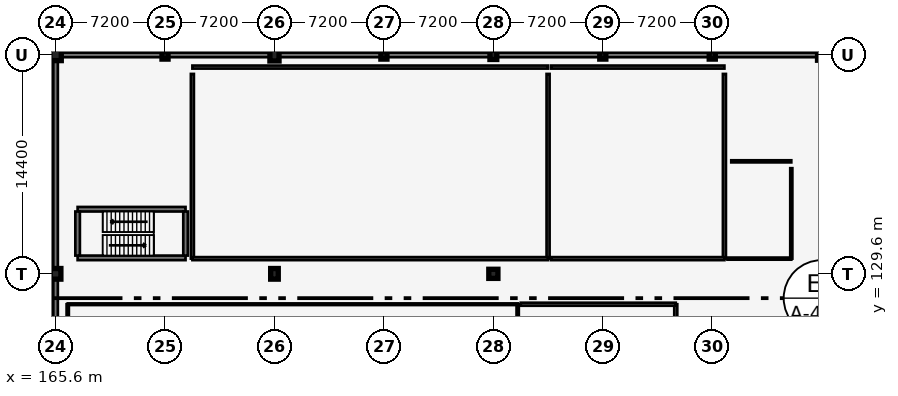
"""IFC4 building model, lengths in metres.
Left out: names, types, materials, properties, quantities, classifications, styles, units other than length and angle.
Written with IfcOpenShell. Run it as: python <this file> out.ifc"""

import sys

from ifc_helpers import new_model, si_unit, direction, frame, frame_2d, origin, origin_2d, place, context, subcontext, project, spatial, rectangle, circle, extrude, element, fill, save


model = new_model("IFC4")
c1 = context("Model", 3, precision=1e-05, world=origin(), true_north=direction((0.0, 1.0)))
c2 = subcontext(c1, "Body", "Model", "MODEL_VIEW")
j1 = project(units=[si_unit("LENGTHUNIT", "METRE"), si_unit("PLANEANGLEUNIT", "RADIAN")], contexts=[c1])
p1 = place(None, origin())
s1 = spatial("IfcSite", under=j1, at=p1, CompositionType="ELEMENT")
p2 = place(p1, origin())
s2 = spatial("IfcBuilding", under=s1, at=p2, CompositionType="ELEMENT")
p3 = place(p2, origin())
s3 = spatial("IfcBuildingStorey", under=s2, at=p3, CompositionType="ELEMENT", Elevation=0.0)
p4 = place(p3, frame((165.6, 129.6, 0.0), z_axis=(0.0, 0.0, 1.0), x_axis=(1.0, 0.0, 0.0)))
e1 = element("IfcColumn", 1, at=p4, inside=s3, PredefinedType="COLUMN", context=c2, shape_type="SweptSolid", body=[
    extrude(rectangle(XDim=0.7, YDim=0.7, at=origin_2d()), origin(), (0.0, 0.0, 1.0), 4.8),
])
p5 = place(p3, frame((165.6, 144.0, 0.0), z_axis=(0.0, 0.0, 1.0), x_axis=(1.0, 0.0, 0.0)))
e2 = element("IfcColumn", 2, at=p5, inside=s3, PredefinedType="COLUMN", context=c2, shape_type="SweptSolid", body=[
    extrude(rectangle(XDim=0.75, YDim=0.75, at=origin_2d()), origin(), (0.0, 0.0, 1.0), 4.8),
])
p6 = place(p3, frame((180.0, 129.6, 0.0), z_axis=(0.0, 0.0, 1.0), x_axis=(1.0, 0.0, 0.0)))
e3 = element("IfcColumn", 3, at=p6, inside=s3, PredefinedType="COLUMN", context=c2, shape_type="SweptSolid", body=[
    extrude(rectangle(XDim=0.5, YDim=0.7, at=origin_2d()), origin(), (0.0, 0.0, 1.0), 4.8),
])
p7 = place(p3, frame((180.0, 144.0, 0.0), z_axis=(0.0, 0.0, 1.0), x_axis=(1.0, 0.0, 0.0)))
e4 = element("IfcColumn", 4, at=p7, inside=s3, PredefinedType="COLUMN", context=c2, shape_type="SweptSolid", body=[
    extrude(rectangle(XDim=0.6, YDim=0.8, at=origin_2d()), origin(), (0.0, 0.0, 1.0), 4.8),
])
p8 = place(p3, frame((194.4, 129.6, 0.0), z_axis=(0.0, 0.0, 1.0), x_axis=(1.0, 0.0, 0.0)))
e5 = element("IfcColumn", 5, at=p8, inside=s3, PredefinedType="COLUMN", context=c2, shape_type="SweptSolid", body=[
    extrude(circle(Radius=0.3, at=origin_2d()), origin(), (0.0, 0.0, 1.0), 4.8),
])
p9 = place(p3, frame((194.4, 144.0, 0.0), z_axis=(0.0, 0.0, 1.0), x_axis=(1.0, 0.0, 0.0)))
e6 = element("IfcColumn", 6, at=p9, inside=s3, PredefinedType="COLUMN", context=c2, shape_type="SweptSolid", body=[
    extrude(rectangle(XDim=0.45, YDim=0.6, at=origin_2d()), origin(), (0.0, 0.0, 1.0), 4.8),
])
p10 = place(p3, frame((216.0, 129.6, 0.0), z_axis=(0.0, 0.0, 1.0), x_axis=(1.0, 0.0, 0.0)))
e7 = element("IfcColumn", 7, at=p10, inside=s3, PredefinedType="COLUMN", context=c2, shape_type="SweptSolid", body=[
    extrude(rectangle(XDim=0.5, YDim=0.65, at=origin_2d()), origin(), (0.0, 0.0, 1.0), 4.8),
])
p11 = place(p3, frame((216.0, 144.0, 0.0), z_axis=(0.0, 0.0, 1.0), x_axis=(1.0, 0.0, 0.0)))
e8 = element("IfcColumn", 8, at=p11, inside=s3, PredefinedType="COLUMN", context=c2, shape_type="SweptSolid", body=[
    extrude(rectangle(XDim=0.55, YDim=0.7, at=origin_2d()), origin(), (0.0, 0.0, 1.0), 4.8),
])
for number, where, z_axis, x_axis in (
    (9, (172.8, 144.0, 0.0), (0.0, 0.0, 1.0), (1.0, 0.0, 0.0)),
    (10, (187.2, 144.0, 0.0), (0.0, 0.0, 1.0), (1.0, 0.0, 0.0)),
    (11, (201.6, 144.0, 0.0), (0.0, 0.0, 1.0), (1.0, 0.0, 0.0)),
    (12, (208.8, 144.0, 0.0), (0.0, 0.0, 1.0), (1.0, 0.0, 0.0)),
):
    element("IfcColumn", number, at=place(p3, frame(where, z_axis=z_axis, x_axis=x_axis)), inside=s3, PredefinedType="PILASTER", context=c2, shape_type="SweptSolid", body=[
        extrude(rectangle(XDim=0.4, YDim=0.55, at=origin_2d()), origin(), (0.0, 0.0, 1.0), 4.4),
    ])
p12 = place(p3, frame((216.0, 144.0, 0.0), z_axis=(0.0, 0.0, 1.0), x_axis=(-1.0, 0.0, 0.0)))
e13 = element("IfcWall", 13, at=p12, inside=s3, PredefinedType="SOLIDWALL", context=c2, shape_type="SweptSolid", body=[
    extrude(rectangle(XDim=50.4, YDim=0.3, at=frame_2d((25.2, 0.0))), origin(), (0.0, 0.0, 1.0), 4.25),
])
p13 = place(p12, frame((2.2, 0.0, 1.4)))
e14 = element("IfcOpeningElement", 14, at=p13, cuts=e13, PredefinedType="OPENING", context=c2, shape_type="SweptSolid", body=[
    extrude(rectangle(XDim=1.5, YDim=1.15, at=frame_2d((0.75, 0.575))), frame((0.0, 0.16, 0.0), z_axis=(0.0, -1.0, 0.0), x_axis=(1.0, 0.0, 0.0)), (0.0, 0.0, 1.0), 0.32),
])
p14 = place(p12, frame((9.4, 0.0, 1.4)))
e15 = element("IfcOpeningElement", 15, at=p14, cuts=e13, PredefinedType="OPENING", context=c2, shape_type="SweptSolid", body=[
    extrude(rectangle(XDim=1.8, YDim=1.15, at=frame_2d((0.9, 0.575))), frame((0.0, 0.16, 0.0), z_axis=(0.0, -1.0, 0.0), x_axis=(1.0, 0.0, 0.0)), (0.0, 0.0, 1.0), 0.32),
])
p15 = place(p12, frame((16.6, 0.0, 1.4)))
e16 = element("IfcOpeningElement", 16, at=p15, cuts=e13, PredefinedType="OPENING", context=c2, shape_type="SweptSolid", body=[
    extrude(rectangle(XDim=1.5, YDim=1.15, at=frame_2d((0.75, 0.575))), frame((0.0, 0.16, 0.0), z_axis=(0.0, -1.0, 0.0), x_axis=(1.0, 0.0, 0.0)), (0.0, 0.0, 1.0), 0.32),
])
p16 = place(p12, frame((23.8, 0.0, 1.4)))
e17 = element("IfcOpeningElement", 17, at=p16, cuts=e13, PredefinedType="OPENING", context=c2, shape_type="SweptSolid", body=[
    extrude(rectangle(XDim=1.8, YDim=1.15, at=frame_2d((0.9, 0.575))), frame((0.0, 0.16, 0.0), z_axis=(0.0, -1.0, 0.0), x_axis=(1.0, 0.0, 0.0)), (0.0, 0.0, 1.0), 0.32),
])
p17 = place(p12, frame((31.0, 0.0, 1.4)))
e18 = element("IfcOpeningElement", 18, at=p17, cuts=e13, PredefinedType="OPENING", context=c2, shape_type="SweptSolid", body=[
    extrude(rectangle(XDim=1.5, YDim=1.15, at=frame_2d((0.75, 0.575))), frame((0.0, 0.16, 0.0), z_axis=(0.0, -1.0, 0.0), x_axis=(1.0, 0.0, 0.0)), (0.0, 0.0, 1.0), 0.32),
])
p18 = place(p12, frame((38.2, 0.0, 1.4)))
e19 = element("IfcOpeningElement", 19, at=p18, cuts=e13, PredefinedType="OPENING", context=c2, shape_type="SweptSolid", body=[
    extrude(rectangle(XDim=1.8, YDim=1.15, at=frame_2d((0.9, 0.575))), frame((0.0, 0.16, 0.0), z_axis=(0.0, -1.0, 0.0), x_axis=(1.0, 0.0, 0.0)), (0.0, 0.0, 1.0), 0.32),
])
p19 = place(p3, frame((165.6, 144.0, 0.0), z_axis=(0.0, 0.0, 1.0), x_axis=(0.0, -1.0, 0.0)))
e20 = element("IfcWall", 20, at=p19, inside=s3, PredefinedType="SOLIDWALL", context=c2, shape_type="SweptSolid", body=[
    extrude(rectangle(XDim=28.8, YDim=0.3, at=frame_2d((14.4, 0.0))), origin(), (0.0, 0.0, 1.0), 4.25),
])
p20 = place(p19, frame((4.2, 0.0, 0.0)))
e21 = element("IfcOpeningElement", 21, at=p20, cuts=e20, PredefinedType="OPENING", context=c2, shape_type="SweptSolid", body=[
    extrude(rectangle(XDim=4.2, YDim=3.5, at=frame_2d((2.1, 1.75))), frame((0.0, 0.16, 0.0), z_axis=(0.0, -1.0, 0.0), x_axis=(1.0, 0.0, 0.0)), (0.0, 0.0, 1.0), 0.32),
])
p21 = place(p19, frame((18.2, 0.0, 0.0)))
e22 = element("IfcOpeningElement", 22, at=p21, cuts=e20, PredefinedType="OPENING", context=c2, shape_type="SweptSolid", body=[
    extrude(rectangle(XDim=4.2, YDim=3.5, at=frame_2d((2.1, 1.75))), frame((0.0, 0.16, 0.0), z_axis=(0.0, -1.0, 0.0), x_axis=(1.0, 0.0, 0.0)), (0.0, 0.0, 1.0), 0.32),
])
p22 = place(p3, frame((167.05, 130.65, 0.0), z_axis=(0.0, 0.0, 1.0), x_axis=(1.0, 0.0, 0.0)))
e23 = element("IfcWall", 23, at=p22, inside=s3, PredefinedType="SHEAR", context=c2, shape_type="SweptSolid", body=[
    extrude(rectangle(XDim=7.1, YDim=0.3, at=frame_2d((3.55, 0.0))), origin(), (0.0, 0.0, 1.0), 4.525),
])
p23 = place(p22, frame((0.35, 0.0, 0.0)))
e24 = element("IfcOpeningElement", 24, at=p23, cuts=e23, PredefinedType="OPENING", context=c2, shape_type="SweptSolid", body=[
    extrude(rectangle(XDim=1.05, YDim=2.15, at=frame_2d((0.525, 1.075))), frame((0.0, 0.16, 0.0), z_axis=(0.0, -1.0, 0.0), x_axis=(1.0, 0.0, 0.0)), (0.0, 0.0, 1.0), 0.32),
])
p24 = place(p3, frame((174.15, 133.85, 0.0), z_axis=(0.0, 0.0, 1.0), x_axis=(-1.0, 0.0, 0.0)))
e25 = element("IfcWall", 25, at=p24, inside=s3, PredefinedType="SHEAR", context=c2, shape_type="SweptSolid", body=[
    extrude(rectangle(XDim=7.1, YDim=0.3, at=frame_2d((3.55, 0.0))), origin(), (0.0, 0.0, 1.0), 4.525),
])
for number, where, z_axis, x_axis in (
    (26, (174.15, 130.8, 0.0), (0.0, 0.0, 1.0), (0.0, 1.0, 0.0)),
    (27, (167.05, 133.7, 0.0), (0.0, 0.0, 1.0), (0.0, -1.0, 0.0)),
):
    element("IfcWall", number, at=place(p3, frame(where, z_axis=z_axis, x_axis=x_axis)), inside=s3, PredefinedType="SHEAR", context=c2, shape_type="SweptSolid", body=[
        extrude(rectangle(XDim=2.9, YDim=0.3, at=frame_2d((1.45, 0.0))), origin(), (0.0, 0.0, 1.0), 4.525),
    ])
for number, where, z_axis, x_axis in (
    (28, (196.0, 116.45, 0.0), (0.0, 0.0, 1.0), (0.0, 1.0, 0.0)),
    (29, (166.4, 127.6, 0.0), (0.0, 0.0, 1.0), (0.0, -1.0, 0.0)),
):
    element("IfcWall", number, at=place(p3, frame(where, z_axis=z_axis, x_axis=x_axis)), inside=s3, PredefinedType="PARTITIONING", context=c2, shape_type="SweptSolid", body=[
        extrude(rectangle(XDim=11.15, YDim=0.15, at=frame_2d((5.575, 0.0))), origin(), (0.0, 0.0, 1.0), 4.1),
    ])
p25 = place(p3, frame((166.4, 127.6, 0.0), z_axis=(0.0, 0.0, 1.0), x_axis=(1.0, 0.0, 0.0)))
e30 = element("IfcWall", 30, at=p25, inside=s3, PredefinedType="PARTITIONING", context=c2, shape_type="SweptSolid", body=[
    extrude(rectangle(XDim=29.6, YDim=0.11, at=frame_2d((14.8, 0.0))), origin(), (0.0, 0.0, 1.0), 3.974),
])
p26 = place(p25, frame((14.32, 0.0, 0.0)))
e31 = element("IfcOpeningElement", 31, at=p26, cuts=e30, PredefinedType="OPENING", context=c2, shape_type="SweptSolid", body=[
    extrude(rectangle(XDim=0.96, YDim=2.15, at=frame_2d((0.48, 1.075))), frame((0.0, 0.065, 0.0), z_axis=(0.0, -1.0, 0.0), x_axis=(1.0, 0.0, 0.0)), (0.0, 0.0, 1.0), 0.13),
])
p27 = place(p3, frame((206.4, 116.45, 0.0), z_axis=(0.0, 0.0, 1.0), x_axis=(0.0, 1.0, 0.0)))
e32 = element("IfcWall", 32, at=p27, inside=s3, PredefinedType="SOLIDWALL", context=c2, shape_type="SweptSolid", body=[
    extrude(rectangle(XDim=11.15, YDim=0.2, at=frame_2d((5.575, 0.0))), origin(), (0.0, 0.0, 1.0), 4.1),
])
p28 = place(p3, frame((196.2, 127.6, 0.0), z_axis=(0.0, 0.0, 1.0), x_axis=(1.0, 0.0, 0.0)))
e33 = element("IfcWall", 33, at=p28, inside=s3, PredefinedType="SOLIDWALL", context=c2, shape_type="SweptSolid", body=[
    extrude(rectangle(XDim=10.2, YDim=0.2, at=frame_2d((5.1, 0.0))), origin(), (0.0, 0.0, 1.0), 4.1),
])
p29 = place(p28, frame((4.2, 0.0, 0.0)))
e34 = element("IfcOpeningElement", 34, at=p29, cuts=e33, PredefinedType="OPENING", context=c2, shape_type="SweptSolid", body=[
    extrude(rectangle(XDim=1.8, YDim=2.2, at=frame_2d((0.9, 1.1))), frame((0.0, 0.11, 0.0), z_axis=(0.0, -1.0, 0.0), x_axis=(1.0, 0.0, 0.0)), (0.0, 0.0, 1.0), 0.22),
])
p30 = place(p3, frame((174.6, 143.2, 0.0), z_axis=(0.0, 0.0, 1.0), x_axis=(1.0, 0.0, 0.0)))
e35 = element("IfcWall", 35, at=p30, inside=s3, PredefinedType="SOLIDWALL", context=c2, shape_type="SweptSolid", body=[
    extrude(rectangle(XDim=23.4, YDim=0.2, at=frame_2d((11.7, 0.0))), origin(), (0.0, 0.0, 1.0), 3.896),
])
for number, where, z_axis, x_axis in (
    (36, (198.0, 130.6, 0.0), (0.0, 0.0, 1.0), (0.0, 1.0, 0.0)),
    (37, (174.6, 142.75, 0.0), (0.0, 0.0, 1.0), (0.0, -1.0, 0.0)),
):
    element("IfcWall", number, at=place(p3, frame(where, z_axis=z_axis, x_axis=x_axis)), inside=s3, PredefinedType="SOLIDWALL", context=c2, shape_type="SweptSolid", body=[
        extrude(rectangle(XDim=12.15, YDim=0.2, at=frame_2d((6.075, 0.0))), origin(), (0.0, 0.0, 1.0), 4.1),
    ])
p31 = place(p3, frame((198.0, 130.6, 0.0), z_axis=(0.0, 0.0, 1.0), x_axis=(-1.0, 0.0, 0.0)))
e38 = element("IfcWall", 38, at=p31, inside=s3, PredefinedType="SOLIDWALL", context=c2, shape_type="SweptSolid", body=[
    extrude(rectangle(XDim=23.4, YDim=0.2, at=frame_2d((11.7, 0.0))), origin(), (0.0, 0.0, 1.0), 3.896),
])
p32 = place(p31, frame((10.8, 0.0, 0.0)))
e39 = element("IfcOpeningElement", 39, at=p32, cuts=e38, PredefinedType="OPENING", context=c2, shape_type="SweptSolid", body=[
    extrude(rectangle(XDim=1.8, YDim=2.2, at=frame_2d((0.9, 1.1))), frame((0.0, 0.11, 0.0), z_axis=(0.0, -1.0, 0.0), x_axis=(1.0, 0.0, 0.0)), (0.0, 0.0, 1.0), 0.22),
])
p33 = place(p3, frame((198.2, 143.2, 0.0), z_axis=(0.0, 0.0, 1.0), x_axis=(1.0, 0.0, 0.0)))
e40 = element("IfcWall", 40, at=p33, inside=s3, PredefinedType="SOLIDWALL", context=c2, shape_type="SweptSolid", body=[
    extrude(rectangle(XDim=11.4, YDim=0.2, at=frame_2d((5.7, 0.0))), origin(), (0.0, 0.0, 1.0), 4.1),
])
p34 = place(p3, frame((209.6, 130.6, 0.0), z_axis=(0.0, 0.0, 1.0), x_axis=(0.0, 1.0, 0.0)))
e41 = element("IfcWall", 41, at=p34, inside=s3, PredefinedType="SOLIDWALL", context=c2, shape_type="SweptSolid", body=[
    extrude(rectangle(XDim=12.15, YDim=0.2, at=frame_2d((6.075, 0.0))), origin(), (0.0, 0.0, 1.0), 4.1),
])
p35 = place(p3, frame((209.6, 130.6, 0.0), z_axis=(0.0, 0.0, 1.0), x_axis=(-1.0, 0.0, 0.0)))
e42 = element("IfcWall", 42, at=p35, inside=s3, PredefinedType="SOLIDWALL", context=c2, shape_type="SweptSolid", body=[
    extrude(rectangle(XDim=11.4, YDim=0.2, at=frame_2d((5.7, 0.0))), origin(), (0.0, 0.0, 1.0), 4.1),
])
p36 = place(p35, frame((4.8, 0.0, 0.0)))
e43 = element("IfcOpeningElement", 43, at=p36, cuts=e42, PredefinedType="OPENING", context=c2, shape_type="SweptSolid", body=[
    extrude(rectangle(XDim=1.8, YDim=2.2, at=frame_2d((0.9, 1.1))), frame((0.0, 0.11, 0.0), z_axis=(0.0, -1.0, 0.0), x_axis=(1.0, 0.0, 0.0)), (0.0, 0.0, 1.0), 0.22),
])
p37 = place(p3, frame((210.05, 137.0, 0.0), z_axis=(0.0, 0.0, 1.0), x_axis=(1.0, 0.0, 0.0)))
e44 = element("IfcWall", 44, at=p37, inside=s3, PredefinedType="PARTITIONING", context=c2, shape_type="SweptSolid", body=[
    extrude(rectangle(XDim=3.95, YDim=0.14, at=frame_2d((1.975, 0.0))), origin(), (0.0, 0.0, 1.0), 3.6),
])
p38 = place(p3, frame((214.0, 130.6, 0.0), z_axis=(0.0, 0.0, 1.0), x_axis=(0.0, 1.0, 0.0)))
e45 = element("IfcWall", 45, at=p38, inside=s3, PredefinedType="PARTITIONING", context=c2, shape_type="SweptSolid", body=[
    extrude(rectangle(XDim=5.95, YDim=0.14, at=frame_2d((2.975, 0.0))), origin(), (0.0, 0.0, 1.0), 3.6),
])
p39 = place(p3, frame((214.0, 130.6, 0.0), z_axis=(0.0, 0.0, 1.0), x_axis=(-1.0, 0.0, 0.0)))
e46 = element("IfcWall", 46, at=p39, inside=s3, PredefinedType="PARTITIONING", context=c2, shape_type="SweptSolid", body=[
    extrude(rectangle(XDim=4.2, YDim=0.14, at=frame_2d((2.1, 0.0))), origin(), (0.0, 0.0, 1.0), 3.6),
])
p40 = place(p39, frame((1.61, 0.0, 0.0)))
e47 = element("IfcOpeningElement", 47, at=p40, cuts=e46, PredefinedType="OPENING", context=c2, shape_type="SweptSolid", body=[
    extrude(rectangle(XDim=0.98, YDim=2.15, at=frame_2d((0.49, 1.075))), frame((0.0, 0.08, 0.0), z_axis=(0.0, -1.0, 0.0), x_axis=(1.0, 0.0, 0.0)), (0.0, 0.0, 1.0), 0.16),
])
p41 = place(p13, origin())
e48 = element("IfcWindow", 48, at=p41, inside=s3, PartitioningType="SINGLE_PANEL", PredefinedType="WINDOW", context=c2, shape_type="SweptSolid", body=[
    extrude(rectangle(XDim=1.5, YDim=1.15, at=frame_2d((0.75, 0.575))), frame((0.0, 0.03, 0.0), z_axis=(0.0, -1.0, 0.0), x_axis=(1.0, 0.0, 0.0)), (0.0, 0.0, 1.0), 0.06),
])
fill(e14, e48)
p42 = place(p14, origin())
e49 = element("IfcWindow", 49, at=p42, inside=s3, PartitioningType="SINGLE_PANEL", PredefinedType="WINDOW", context=c2, shape_type="SweptSolid", body=[
    extrude(rectangle(XDim=1.8, YDim=1.15, at=frame_2d((0.9, 0.575))), frame((0.0, 0.03, 0.0), z_axis=(0.0, -1.0, 0.0), x_axis=(1.0, 0.0, 0.0)), (0.0, 0.0, 1.0), 0.06),
])
fill(e15, e49)
p43 = place(p15, origin())
e50 = element("IfcWindow", 50, at=p43, inside=s3, PartitioningType="SINGLE_PANEL", PredefinedType="WINDOW", context=c2, shape_type="SweptSolid", body=[
    extrude(rectangle(XDim=1.5, YDim=1.15, at=frame_2d((0.75, 0.575))), frame((0.0, 0.03, 0.0), z_axis=(0.0, -1.0, 0.0), x_axis=(1.0, 0.0, 0.0)), (0.0, 0.0, 1.0), 0.06),
])
fill(e16, e50)
p44 = place(p16, origin())
e51 = element("IfcWindow", 51, at=p44, inside=s3, PartitioningType="SINGLE_PANEL", PredefinedType="WINDOW", context=c2, shape_type="SweptSolid", body=[
    extrude(rectangle(XDim=1.8, YDim=1.15, at=frame_2d((0.9, 0.575))), frame((0.0, 0.03, 0.0), z_axis=(0.0, -1.0, 0.0), x_axis=(1.0, 0.0, 0.0)), (0.0, 0.0, 1.0), 0.06),
])
fill(e17, e51)
p45 = place(p17, origin())
e52 = element("IfcWindow", 52, at=p45, inside=s3, PartitioningType="SINGLE_PANEL", PredefinedType="WINDOW", context=c2, shape_type="SweptSolid", body=[
    extrude(rectangle(XDim=1.5, YDim=1.15, at=frame_2d((0.75, 0.575))), frame((0.0, 0.03, 0.0), z_axis=(0.0, -1.0, 0.0), x_axis=(1.0, 0.0, 0.0)), (0.0, 0.0, 1.0), 0.06),
])
fill(e18, e52)
p46 = place(p18, origin())
e53 = element("IfcWindow", 53, at=p46, inside=s3, PartitioningType="SINGLE_PANEL", PredefinedType="WINDOW", context=c2, shape_type="SweptSolid", body=[
    extrude(rectangle(XDim=1.8, YDim=1.15, at=frame_2d((0.9, 0.575))), frame((0.0, 0.03, 0.0), z_axis=(0.0, -1.0, 0.0), x_axis=(1.0, 0.0, 0.0)), (0.0, 0.0, 1.0), 0.06),
])
fill(e19, e53)
p47 = place(p20, origin())
e54 = element("IfcDoor", 54, at=p47, inside=s3, OperationType="ROLLINGUP", PredefinedType="GATE", context=c2, shape_type="SweptSolid", body=[
    extrude(rectangle(XDim=4.2, YDim=3.5, at=frame_2d((2.1, 1.75))), frame((0.0, 0.025, 0.0), z_axis=(0.0, -1.0, 0.0), x_axis=(1.0, 0.0, 0.0)), (0.0, 0.0, 1.0), 0.05),
])
fill(e21, e54)
p48 = place(p23, frame((1.05, 0.0, 0.0), z_axis=(0.0, 0.0, 1.0), x_axis=(-1.0, 0.0, 0.0)))
e55 = element("IfcDoor", 55, at=p48, inside=s3, OperationType="SINGLE_SWING_LEFT", PredefinedType="DOOR", context=c2, shape_type="SweptSolid", body=[
    extrude(rectangle(XDim=1.05, YDim=2.15, at=frame_2d((0.525, 1.075))), frame((0.0, 0.025, 0.0), z_axis=(0.0, -1.0, 0.0), x_axis=(1.0, 0.0, 0.0)), (0.0, 0.0, 1.0), 0.05),
])
fill(e24, e55)
p49 = place(p26, origin())
e56 = element("IfcDoor", 56, at=p49, inside=s3, OperationType="SINGLE_SWING_LEFT", PredefinedType="DOOR", context=c2, shape_type="SweptSolid", body=[
    extrude(rectangle(XDim=0.96, YDim=2.15, at=frame_2d((0.48, 1.075))), frame((0.0, 0.025, 0.0), z_axis=(0.0, -1.0, 0.0), x_axis=(1.0, 0.0, 0.0)), (0.0, 0.0, 1.0), 0.05),
])
fill(e31, e56)
p50 = place(p29, origin())
e57 = element("IfcDoor", 57, at=p50, inside=s3, OperationType="DOUBLE_SWING_LEFT", PredefinedType="DOOR", context=c2, shape_type="SweptSolid", body=[
    extrude(rectangle(XDim=1.8, YDim=2.2, at=frame_2d((0.9, 1.1))), frame((0.0, 0.025, 0.0), z_axis=(0.0, -1.0, 0.0), x_axis=(1.0, 0.0, 0.0)), (0.0, 0.0, 1.0), 0.05),
])
fill(e34, e57)
p51 = place(p32, origin())
e58 = element("IfcDoor", 58, at=p51, inside=s3, OperationType="DOUBLE_SWING_LEFT", PredefinedType="DOOR", context=c2, shape_type="SweptSolid", body=[
    extrude(rectangle(XDim=1.8, YDim=2.2, at=frame_2d((0.9, 1.1))), frame((0.0, 0.025, 0.0), z_axis=(0.0, -1.0, 0.0), x_axis=(1.0, 0.0, 0.0)), (0.0, 0.0, 1.0), 0.05),
])
fill(e39, e58)
p52 = place(p36, origin())
e59 = element("IfcDoor", 59, at=p52, inside=s3, OperationType="DOUBLE_SWING_LEFT", PredefinedType="DOOR", context=c2, shape_type="SweptSolid", body=[
    extrude(rectangle(XDim=1.8, YDim=2.2, at=frame_2d((0.9, 1.1))), frame((0.0, 0.025, 0.0), z_axis=(0.0, -1.0, 0.0), x_axis=(1.0, 0.0, 0.0)), (0.0, 0.0, 1.0), 0.05),
])
fill(e43, e59)
p53 = place(p40, origin())
e60 = element("IfcDoor", 60, at=p53, inside=s3, OperationType="SINGLE_SWING_LEFT", PredefinedType="DOOR", context=c2, shape_type="SweptSolid", body=[
    extrude(rectangle(XDim=0.98, YDim=2.15, at=frame_2d((0.49, 1.075))), frame((0.0, 0.025, 0.0), z_axis=(0.0, -1.0, 0.0), x_axis=(1.0, 0.0, 0.0)), (0.0, 0.0, 1.0), 0.05),
])
fill(e47, e60)
save(model, sys.argv[1])
